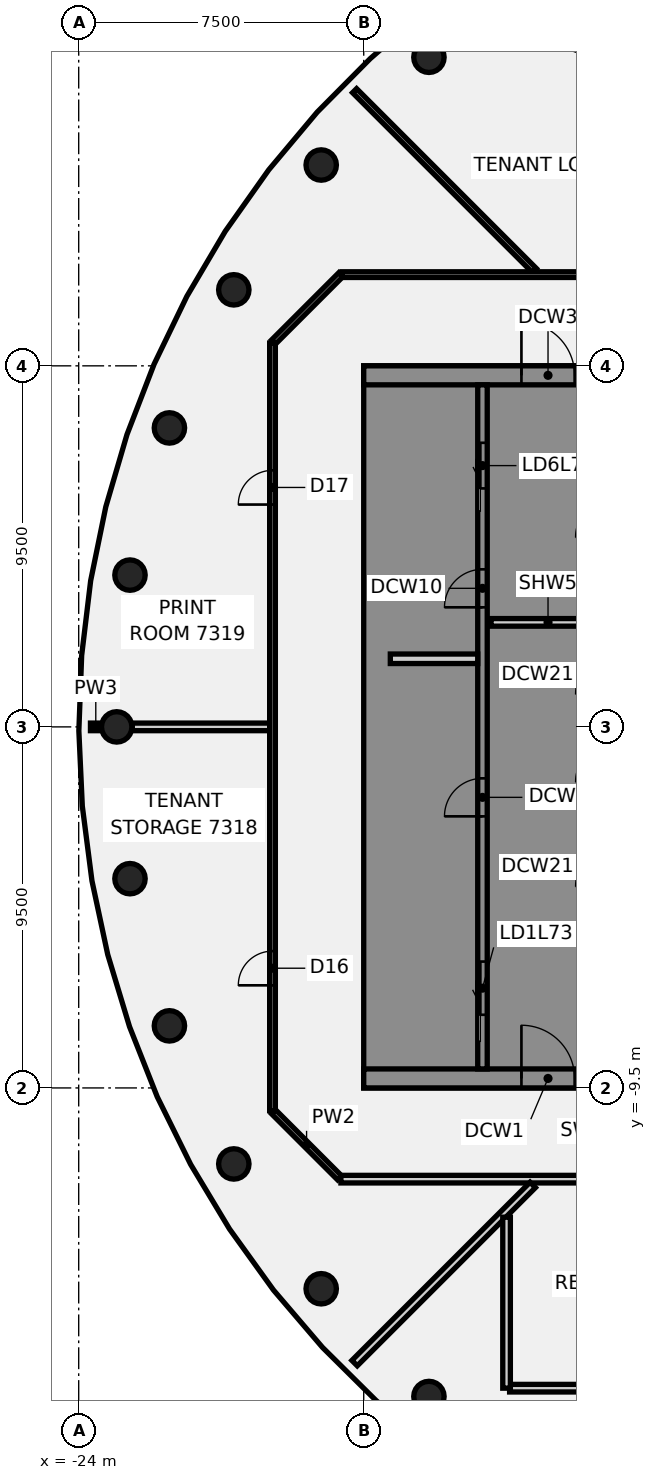
"""IFC4 building model, lengths in metres.
Left out: names, types, materials, properties, quantities, classifications, styles, units other than length and angle.
Written with IfcOpenShell. Run it as: python <this file> out.ifc"""

import sys

from ifc_helpers import new_model, si_unit, direction, frame, frame_2d, origin, origin_2d, place, context, subcontext, project, spatial, polyline, rectangle, circle, outline, extrude, element, fill, save


model = new_model("IFC4")
c1 = context("Model", 3, precision=1e-05, world=origin(), true_north=direction((0.0, 1.0)))
c2 = subcontext(c1, "Body", "Model", "MODEL_VIEW")
j1 = project(units=[si_unit("LENGTHUNIT", "METRE"), si_unit("PLANEANGLEUNIT", "RADIAN")], contexts=[c1])
p1 = place(None, origin())
s1 = spatial("IfcSite", under=j1, at=p1, CompositionType="ELEMENT")
p2 = place(p1, origin())
s2 = spatial("IfcBuilding", under=s1, at=p2, CompositionType="ELEMENT")
p3 = place(p2, frame((0.0, 0.0, 294.4)))
s3 = spatial("IfcBuildingStorey", under=s2, at=p3, CompositionType="ELEMENT", Elevation=294.4)
for number, where, z_axis, x_axis in (
    (1, (-14.784, 17.619, -0.2), (0.0, 0.0, 1.0), (1.0, 0.0, 0.0)),
    (2, (-17.619, 14.784, -0.2), (0.0, 0.0, 1.0), (1.0, 0.0, 0.0)),
    (3, (-19.919, 11.5, -0.2), (0.0, 0.0, 1.0), (1.0, 0.0, 0.0)),
    (4, (-21.613, 7.866, -0.2), (0.0, 0.0, 1.0), (1.0, 0.0, 0.0)),
    (5, (-22.651, 3.994, -0.2), (0.0, 0.0, 1.0), (1.0, 0.0, 0.0)),
    (6, (-23.0, 0.0, -0.2), (0.0, 0.0, 1.0), (1.0, 0.0, 0.0)),
    (7, (-22.651, -3.994, -0.2), (0.0, 0.0, 1.0), (1.0, 0.0, 0.0)),
    (8, (-21.613, -7.866, -0.2), (0.0, 0.0, 1.0), (1.0, 0.0, 0.0)),
    (9, (-19.919, -11.5, -0.2), (0.0, 0.0, 1.0), (1.0, 0.0, 0.0)),
    (10, (-17.619, -14.784, -0.2), (0.0, 0.0, 1.0), (1.0, 0.0, 0.0)),
    (11, (-14.784, -17.619, -0.2), (0.0, 0.0, 1.0), (1.0, 0.0, 0.0)),
):
    element("IfcColumn", number, at=place(p3, frame(where, z_axis=z_axis, x_axis=x_axis)), inside=s3, PredefinedType="COLUMN", context=c2, shape_type="SweptSolid", body=[
        extrude(circle(Radius=0.4, at=origin_2d()), origin(), (0.0, 0.0, 1.0), 4.95),
    ])
p4 = place(p3, frame((-18.872, -10.128, 0.0), z_axis=(0.0, 0.0, 1.0), x_axis=(0.707106781187, -0.707106781187, 0.0)))
e12 = element("IfcWall", 12, at=p4, inside=s3, PredefinedType="PARTITIONING", context=c2, shape_type="SweptSolid", body=[
    extrude(rectangle(XDim=2.455, YDim=0.15, at=frame_2d((1.228, 0.0))), origin(), (0.0, 0.0, 1.0), 4.05),
])
p5 = place(p3, frame((-16.74, 16.74, 0.0), z_axis=(0.0, 0.0, 1.0), x_axis=(0.707106781187, -0.707106781187, 0.0)))
e13 = element("IfcWall", 13, at=p5, inside=s3, PredefinedType="PARTITIONING", context=c2, shape_type="SweptSolid", body=[
    extrude(rectangle(XDim=6.691, YDim=0.15, at=frame_2d((3.345, 0.0))), origin(), (0.0, 0.0, 1.0), 4.05),
])
p6 = place(p3, frame((-14.823, 19.308, 0.0), z_axis=(0.0, 0.0, 1.0), x_axis=(0.939695278184, -0.342012842095, 0.0)))
e14 = element("IfcWall", 14, at=p6, inside=s3, PredefinedType="PARTITIONING", context=c2, shape_type="SweptSolid", body=[
    extrude(rectangle(XDim=21.289, YDim=0.15, at=frame_2d((10.644, 0.0))), origin(), (0.0, 0.0, 1.0), 4.05),
])
p7 = place(p3, frame((-23.691, 0.0, 0.0), z_axis=(0.0, 0.0, 1.0), x_axis=(1.0, 0.0, 0.0)))
e15 = element("IfcWall", 15, at=p7, inside=s3, PredefinedType="PARTITIONING", context=c2, shape_type="SweptSolid", body=[
    extrude(rectangle(XDim=0.281, YDim=0.2, at=frame_2d((0.14, 0.0))), origin(), (0.0, 0.0, 1.0), 4.05),
])
p8 = place(p3, frame((-22.59, 0.0, 0.0), z_axis=(0.0, 0.0, 1.0), x_axis=(1.0, 0.0, 0.0)))
e16 = element("IfcWall", 16, at=p8, inside=s3, PredefinedType="PARTITIONING", context=c2, shape_type="SweptSolid", body=[
    extrude(rectangle(XDim=3.635, YDim=0.2, at=frame_2d((1.817, 0.0))), origin(), (0.0, 0.0, 1.0), 4.05),
])
p9 = place(p3, frame((-17.1, -11.9, 0.0), z_axis=(0.0, 0.0, 1.0), x_axis=(1.0, 0.0, 0.0)))
e17 = element("IfcWall", 17, at=p9, inside=s3, PredefinedType="PARTITIONING", context=c2, shape_type="SweptSolid", body=[
    extrude(rectangle(XDim=34.165, YDim=0.2, at=frame_2d((17.083, 0.0))), origin(), (0.0, 0.0, 1.0), 4.05),
])
p10 = place(p9, frame((7.75, 0.0, 0.0)))
e18 = element("IfcOpeningElement", 18, at=p10, cuts=e17, PredefinedType="OPENING", context=c2, shape_type="SweptSolid", body=[
    extrude(rectangle(XDim=0.9, YDim=2.1, at=frame_2d((0.45, 1.05))), frame((0.0, 0.11, 0.0), z_axis=(0.0, -1.0, 0.0), x_axis=(1.0, 0.0, 0.0)), (0.0, 0.0, 1.0), 0.22),
])
p11 = place(p9, frame((26.091, 0.0, 0.0)))
e19 = element("IfcOpeningElement", 19, at=p11, cuts=e17, PredefinedType="OPENING", context=c2, shape_type="SweptSolid", body=[
    extrude(rectangle(XDim=1.8, YDim=2.1, at=frame_2d((0.9, 1.05))), frame((0.0, 0.11, 0.0), z_axis=(0.0, -1.0, 0.0), x_axis=(1.0, 0.0, 0.0)), (0.0, 0.0, 1.0), 0.22),
])
p12 = place(p9, frame((17.709, 0.0, 0.0)))
e20 = element("IfcOpeningElement", 20, at=p12, cuts=e17, PredefinedType="OPENING", context=c2, shape_type="SweptSolid", body=[
    extrude(rectangle(XDim=1.8, YDim=2.1, at=frame_2d((0.9, 1.05))), frame((0.0, 0.11, 0.0), z_axis=(0.0, -1.0, 0.0), x_axis=(1.0, 0.0, 0.0)), (0.0, 0.0, 1.0), 0.22),
])
p13 = place(p9, frame((31.7, 0.0, 0.0)))
e21 = element("IfcOpeningElement", 21, at=p13, cuts=e17, PredefinedType="OPENING", context=c2, shape_type="SweptSolid", body=[
    extrude(rectangle(XDim=0.9, YDim=2.1, at=frame_2d((0.45, 1.05))), frame((0.0, 0.11, 0.0), z_axis=(0.0, -1.0, 0.0), x_axis=(1.0, 0.0, 0.0)), (0.0, 0.0, 1.0), 0.22),
])
p14 = place(p3, frame((-17.065, 11.9, 0.0), z_axis=(0.0, 0.0, 1.0), x_axis=(1.0, 0.0, 0.0)))
e22 = element("IfcWall", 22, at=p14, inside=s3, PredefinedType="PARTITIONING", context=c2, shape_type="SweptSolid", body=[
    extrude(rectangle(XDim=34.165, YDim=0.15, at=frame_2d((17.083, 0.0))), origin(), (0.0, 0.0, 1.0), 4.05),
])
p15 = place(p14, frame((24.544, 0.0, 0.0)))
e23 = element("IfcOpeningElement", 23, at=p15, cuts=e22, PredefinedType="OPENING", context=c2, shape_type="SweptSolid", body=[
    extrude(rectangle(XDim=1.8, YDim=2.1, at=frame_2d((0.9, 1.05))), frame((0.0, 0.085, 0.0), z_axis=(0.0, -1.0, 0.0), x_axis=(1.0, 0.0, 0.0)), (0.0, 0.0, 1.0), 0.17),
])
p16 = place(p14, frame((31.665, 0.0, 0.0)))
e24 = element("IfcOpeningElement", 24, at=p16, cuts=e22, PredefinedType="OPENING", context=c2, shape_type="SweptSolid", body=[
    extrude(rectangle(XDim=0.9, YDim=2.1, at=frame_2d((0.45, 1.05))), frame((0.0, 0.085, 0.0), z_axis=(0.0, -1.0, 0.0), x_axis=(1.0, 0.0, 0.0)), (0.0, 0.0, 1.0), 0.17),
])
p17 = place(p14, frame((10.565, 0.0, 0.0)))
e25 = element("IfcOpeningElement", 25, at=p17, cuts=e22, PredefinedType="OPENING", context=c2, shape_type="SweptSolid", body=[
    extrude(rectangle(XDim=1.8, YDim=2.1, at=frame_2d((0.9, 1.05))), frame((0.0, 0.085, 0.0), z_axis=(0.0, -1.0, 0.0), x_axis=(1.0, 0.0, 0.0)), (0.0, 0.0, 1.0), 0.17),
])
p18 = place(p3, frame((-12.661, -17.4, 0.0), z_axis=(0.0, 0.0, 1.0), x_axis=(1.0, 0.0, 0.0)))
e26 = element("IfcWall", 26, at=p18, inside=s3, PredefinedType="PARTITIONING", context=c2, shape_type="SweptSolid", body=[
    extrude(rectangle(XDim=8.835, YDim=0.2, at=frame_2d((4.417, 0.0))), origin(), (0.0, 0.0, 1.0), 4.05),
])
p19 = place(p3, frame((-18.872, 10.128, 0.0), z_axis=(0.0, 0.0, 1.0), x_axis=(0.707106781187, 0.707106781187, 0.0)))
e27 = element("IfcWall", 27, at=p19, inside=s3, PredefinedType="PARTITIONING", context=c2, shape_type="SweptSolid", body=[
    extrude(rectangle(XDim=2.505, YDim=0.15, at=frame_2d((1.253, 0.0))), origin(), (0.0, 0.0, 1.0), 4.05),
])
p20 = place(p3, frame((-16.74, -16.74, 0.0), z_axis=(0.0, 0.0, 1.0), x_axis=(0.707106781187, 0.707106781187, 0.0)))
e28 = element("IfcWall", 28, at=p20, inside=s3, PredefinedType="PARTITIONING", context=c2, shape_type="SweptSolid", body=[
    extrude(rectangle(XDim=6.631, YDim=0.2, at=frame_2d((3.315, 0.0))), origin(), (0.0, 0.0, 1.0), 4.05),
])
p21 = place(p3, frame((-18.9, -10.1, 0.0), z_axis=(0.0, 0.0, 1.0), x_axis=(0.0, 1.0, 0.0)))
e29 = element("IfcWall", 29, at=p21, inside=s3, PredefinedType="PARTITIONING", context=c2, shape_type="SweptSolid", body=[
    extrude(rectangle(XDim=20.2, YDim=0.15, at=frame_2d((10.1, 0.0))), origin(), (0.0, 0.0, 1.0), 4.05),
])
p22 = place(p21, frame((3.3, 0.0, 0.0)))
e30 = element("IfcOpeningElement", 30, at=p22, cuts=e29, PredefinedType="OPENING", context=c2, shape_type="SweptSolid", body=[
    extrude(rectangle(XDim=0.9, YDim=2.1, at=frame_2d((0.45, 1.05))), frame((0.0, 0.085, 0.0), z_axis=(0.0, -1.0, 0.0), x_axis=(1.0, 0.0, 0.0)), (0.0, 0.0, 1.0), 0.17),
])
p23 = place(p21, frame((15.95, 0.0, 0.0)))
e31 = element("IfcOpeningElement", 31, at=p23, cuts=e29, PredefinedType="OPENING", context=c2, shape_type="SweptSolid", body=[
    extrude(rectangle(XDim=0.9, YDim=2.1, at=frame_2d((0.45, 1.05))), frame((0.0, 0.085, 0.0), z_axis=(0.0, -1.0, 0.0), x_axis=(1.0, 0.0, 0.0)), (0.0, 0.0, 1.0), 0.17),
])
p24 = place(p3, frame((-12.741, -17.4, 0.0), z_axis=(0.0, 0.0, 1.0), x_axis=(0.0, 1.0, 0.0)))
e32 = element("IfcWall", 32, at=p24, inside=s3, PredefinedType="PARTITIONING", context=c2, shape_type="SweptSolid", body=[
    extrude(rectangle(XDim=4.499, YDim=0.2, at=frame_2d((2.25, 0.0))), origin(), (0.0, 0.0, 1.0), 4.05),
])
p25 = place(p3, frame((-16.5, -9.25, 0.0), z_axis=(0.0, 0.0, 1.0), x_axis=(1.0, 0.0, 0.0)))
e33 = element("IfcWall", 33, at=p25, inside=s3, PredefinedType="SHEAR", context=c2, shape_type="SweptSolid", body=[
    extrude(rectangle(XDim=13.0, YDim=0.5, at=frame_2d((6.5, 0.0))), origin(), (0.0, 0.0, 1.0), 4.75),
])
p26 = place(p25, frame((4.15, 0.0, 0.0)))
e34 = element("IfcOpeningElement", 34, at=p26, cuts=e33, PredefinedType="OPENING", context=c2, shape_type="SweptSolid", body=[
    extrude(rectangle(XDim=1.4, YDim=2.1, at=frame_2d((0.7, 1.05))), frame((0.0, 0.26, 0.0), z_axis=(0.0, -1.0, 0.0), x_axis=(1.0, 0.0, 0.0)), (0.0, 0.0, 1.0), 0.52),
])
p27 = place(p25, frame((10.125, 0.0, 0.0)))
e35 = element("IfcOpeningElement", 35, at=p27, cuts=e33, PredefinedType="OPENING", context=c2, shape_type="SweptSolid", body=[
    extrude(rectangle(XDim=1.4, YDim=2.1, at=frame_2d((0.7, 1.05))), frame((0.0, 0.26, 0.0), z_axis=(0.0, -1.0, 0.0), x_axis=(1.0, 0.0, 0.0)), (0.0, 0.0, 1.0), 0.52),
])
p28 = place(p3, frame((-16.5, 9.25, 0.0), z_axis=(0.0, 0.0, 1.0), x_axis=(1.0, 0.0, 0.0)))
e36 = element("IfcWall", 36, at=p28, inside=s3, PredefinedType="SHEAR", context=c2, shape_type="SweptSolid", body=[
    extrude(rectangle(XDim=13.0, YDim=0.5, at=frame_2d((6.5, 0.0))), origin(), (0.0, 0.0, 1.0), 4.75),
])
p29 = place(p28, frame((4.15, 0.0, 0.0)))
e37 = element("IfcOpeningElement", 37, at=p29, cuts=e36, PredefinedType="OPENING", context=c2, shape_type="SweptSolid", body=[
    extrude(rectangle(XDim=1.4, YDim=2.1, at=frame_2d((0.7, 1.05))), frame((0.0, 0.26, 0.0), z_axis=(0.0, -1.0, 0.0), x_axis=(1.0, 0.0, 0.0)), (0.0, 0.0, 1.0), 0.52),
])
p30 = place(p3, frame((-13.15, 2.75, 0.0), z_axis=(0.0, 0.0, 1.0), x_axis=(1.0, 0.0, 0.0)))
e38 = element("IfcWall", 38, at=p30, inside=s3, PredefinedType="PARTITIONING", context=c2, shape_type="SweptSolid", body=[
    extrude(rectangle(XDim=3.0, YDim=0.2, at=frame_2d((1.5, 0.0))), origin(), (0.0, 0.0, 1.0), 4.75),
])
p31 = place(p3, origin())
e39 = element("IfcWall", 39, at=p31, inside=s3, PredefinedType="SHEAR", context=c2, shape_type="SweptSolid", body=[
    extrude(outline(polyline([(-13.5, -8.125), (-16.0, -8.125), (-16.0, -5.625), (-13.5, -5.625), (-13.5, -5.375), (-16.0, -5.375), (-16.0, 5.375), (-13.5, 5.375), (-13.5, 5.625), (-16.0, 5.625), (-16.0, 8.125), (-13.5, 8.125), (-13.5, 9.0), (-16.0, 9.0), (-16.5, 9.0), (-16.5, -9.0), (-16.0, -9.0), (-13.5, -9.0), (-13.5, -8.125)])), origin(), (0.0, 0.0, 1.0), 4.75),
])
p32 = place(p3, frame((-13.375, -9.0, 0.0), z_axis=(0.0, 0.0, 1.0), x_axis=(0.0, 1.0, 0.0)))
e40 = element("IfcWall", 40, at=p32, inside=s3, PredefinedType="SHEAR", context=c2, shape_type="SweptSolid", body=[
    extrude(rectangle(XDim=18.0, YDim=0.25, at=frame_2d((9.0, 0.0))), origin(), (0.0, 0.0, 1.0), 4.75),
])
p33 = place(p32, frame((1.425, 0.0, 0.0)))
e41 = element("IfcOpeningElement", 41, at=p33, cuts=e40, PredefinedType="OPENING", context=c2, shape_type="SweptSolid", body=[
    extrude(rectangle(XDim=1.4, YDim=2.1, at=frame_2d((0.7, 1.05))), frame((0.0, 0.135, 0.0), z_axis=(0.0, -1.0, 0.0), x_axis=(1.0, 0.0, 0.0)), (0.0, 0.0, 1.0), 0.27),
])
p34 = place(p32, frame((15.275, 0.0, 0.0)))
e42 = element("IfcOpeningElement", 42, at=p34, cuts=e40, PredefinedType="OPENING", context=c2, shape_type="SweptSolid", body=[
    extrude(rectangle(XDim=1.2, YDim=2.1, at=frame_2d((0.6, 1.05))), frame((0.0, 0.135, 0.0), z_axis=(0.0, -1.0, 0.0), x_axis=(1.0, 0.0, 0.0)), (0.0, 0.0, 1.0), 0.27),
])
p35 = place(p32, frame((6.646, 0.0, 0.0)))
e43 = element("IfcOpeningElement", 43, at=p35, cuts=e40, PredefinedType="OPENING", context=c2, shape_type="SweptSolid", body=[
    extrude(rectangle(XDim=1.0, YDim=2.1, at=frame_2d((0.5, 1.05))), frame((0.0, 0.135, 0.0), z_axis=(0.0, -1.0, 0.0), x_axis=(1.0, 0.0, 0.0)), (0.0, 0.0, 1.0), 0.27),
])
p36 = place(p32, frame((12.146, 0.0, 0.0)))
e44 = element("IfcOpeningElement", 44, at=p36, cuts=e40, PredefinedType="OPENING", context=c2, shape_type="SweptSolid", body=[
    extrude(rectangle(XDim=1.0, YDim=2.1, at=frame_2d((0.5, 1.05))), frame((0.0, 0.135, 0.0), z_axis=(0.0, -1.0, 0.0), x_axis=(1.0, 0.0, 0.0)), (0.0, 0.0, 1.0), 0.27),
])
p37 = place(p3, frame((-15.8, 1.792, 0.0), z_axis=(0.0, 0.0, 1.0), x_axis=(1.0, 0.0, 0.0)))
e45 = element("IfcWall", 45, at=p37, inside=s3, PredefinedType="PARTITIONING", context=c2, shape_type="SweptSolid", body=[
    extrude(rectangle(XDim=2.3, YDim=0.25, at=frame_2d((1.15, 0.0))), origin(), (0.0, 0.0, 1.0), 4.75),
])
p38 = place(p22, origin())
e46 = element("IfcDoor", 46, at=p38, inside=s3, OperationType="SINGLE_SWING_RIGHT", PredefinedType="DOOR", context=c2, shape_type="SweptSolid", body=[
    extrude(rectangle(XDim=0.9, YDim=2.1, at=frame_2d((0.45, 1.05))), frame((0.0, 0.025, 0.0), z_axis=(0.0, -1.0, 0.0), x_axis=(1.0, 0.0, 0.0)), (0.0, 0.0, 1.0), 0.05),
])
fill(e30, e46)
p39 = place(p23, origin())
e47 = element("IfcDoor", 47, at=p39, inside=s3, OperationType="SINGLE_SWING_LEFT", PredefinedType="DOOR", context=c2, shape_type="SweptSolid", body=[
    extrude(rectangle(XDim=0.9, YDim=2.1, at=frame_2d((0.45, 1.05))), frame((0.0, 0.025, 0.0), z_axis=(0.0, -1.0, 0.0), x_axis=(1.0, 0.0, 0.0)), (0.0, 0.0, 1.0), 0.05),
])
fill(e31, e47)
p40 = place(p26, origin())
e48 = element("IfcDoor", 48, at=p40, inside=s3, OperationType="SINGLE_SWING_LEFT", PredefinedType="DOOR", context=c2, shape_type="SweptSolid", body=[
    extrude(rectangle(XDim=1.4, YDim=2.1, at=frame_2d((0.7, 1.05))), frame((0.0, 0.025, 0.0), z_axis=(0.0, -1.0, 0.0), x_axis=(1.0, 0.0, 0.0)), (0.0, 0.0, 1.0), 0.05),
])
fill(e34, e48)
p41 = place(p29, origin())
e49 = element("IfcDoor", 49, at=p41, inside=s3, OperationType="SINGLE_SWING_LEFT", PredefinedType="DOOR", context=c2, shape_type="SweptSolid", body=[
    extrude(rectangle(XDim=1.4, YDim=2.1, at=frame_2d((0.7, 1.05))), frame((0.0, 0.025, 0.0), z_axis=(0.0, -1.0, 0.0), x_axis=(1.0, 0.0, 0.0)), (0.0, 0.0, 1.0), 0.05),
])
fill(e37, e49)
p42 = place(p33, origin())
e50 = element("IfcDoor", 50, at=p42, inside=s3, OperationType="SLIDING_TO_LEFT", PredefinedType="DOOR", context=c2, shape_type="SweptSolid", body=[
    extrude(rectangle(XDim=1.4, YDim=2.1, at=frame_2d((0.7, 1.05))), frame((0.0, 0.025, 0.0), z_axis=(0.0, -1.0, 0.0), x_axis=(1.0, 0.0, 0.0)), (0.0, 0.0, 1.0), 0.05),
])
fill(e41, e50)
p43 = place(p34, origin())
e51 = element("IfcDoor", 51, at=p43, inside=s3, OperationType="SLIDING_TO_LEFT", PredefinedType="DOOR", context=c2, shape_type="SweptSolid", body=[
    extrude(rectangle(XDim=1.2, YDim=2.1, at=frame_2d((0.6, 1.05))), frame((0.0, 0.025, 0.0), z_axis=(0.0, -1.0, 0.0), x_axis=(1.0, 0.0, 0.0)), (0.0, 0.0, 1.0), 0.05),
])
fill(e42, e51)
p44 = place(p35, origin())
e52 = element("IfcDoor", 52, at=p44, inside=s3, OperationType="SINGLE_SWING_LEFT", PredefinedType="DOOR", context=c2, shape_type="SweptSolid", body=[
    extrude(rectangle(XDim=1.0, YDim=2.1, at=frame_2d((0.5, 1.05))), frame((0.0, 0.025, 0.0), z_axis=(0.0, -1.0, 0.0), x_axis=(1.0, 0.0, 0.0)), (0.0, 0.0, 1.0), 0.05),
])
fill(e43, e52)
p45 = place(p36, origin())
e53 = element("IfcDoor", 53, at=p45, inside=s3, OperationType="SINGLE_SWING_LEFT", PredefinedType="DOOR", context=c2, shape_type="SweptSolid", body=[
    extrude(rectangle(XDim=1.0, YDim=2.1, at=frame_2d((0.5, 1.05))), frame((0.0, 0.025, 0.0), z_axis=(0.0, -1.0, 0.0), x_axis=(1.0, 0.0, 0.0)), (0.0, 0.0, 1.0), 0.05),
])
fill(e44, e53)
save(model, sys.argv[1])
